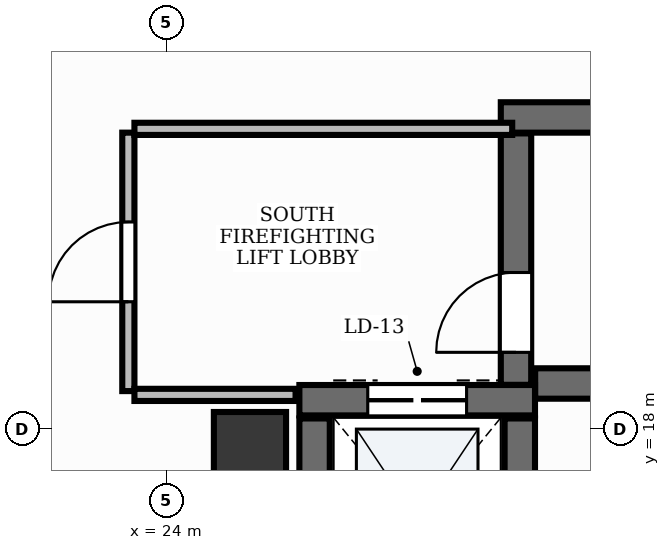
"""IFC4 building model, lengths in metres.
Left out: names, types, materials, properties, quantities, classifications, styles, units other than length and angle.
Written with IfcOpenShell. Run it as: python <this file> out.ifc"""

import sys

from ifc_helpers import new_model, si_unit, direction, frame, frame_2d, origin, origin_2d, place, context, subcontext, project, spatial, rectangle, extrude, element, fill, save


model = new_model("IFC4")
c1 = context("Model", 3, precision=1e-05, world=origin(), true_north=direction((0.0, 1.0)))
c2 = subcontext(c1, "Body", "Model", "MODEL_VIEW")
j1 = project(units=[si_unit("LENGTHUNIT", "METRE"), si_unit("PLANEANGLEUNIT", "RADIAN")], contexts=[c1])
p1 = place(None, origin())
s1 = spatial("IfcSite", under=j1, at=p1, CompositionType="ELEMENT")
p2 = place(p1, origin())
s2 = spatial("IfcBuilding", under=s1, at=p2, CompositionType="ELEMENT")
p3 = place(p2, frame((0.0, 0.0, 175.2)))
s3 = spatial("IfcBuildingStorey", under=s2, at=p3, CompositionType="ELEMENT", Elevation=175.2)
p4 = place(p3, frame((28.852, 18.6, 0.0), z_axis=(0.0, 0.0, 1.0), x_axis=(1.0, 0.0, 0.0)))
e1 = element("IfcWall", 1, at=p4, inside=s3, PredefinedType="SHEAR", context=c2, shape_type="SweptSolid", body=[
    extrude(rectangle(XDim=8.198, YDim=0.4, at=frame_2d((4.099, 0.0))), origin(), (0.0, 0.0, 1.0), 3.9),
])
p5 = place(p3, frame((28.4, 22.1, 0.0), z_axis=(0.0, 0.0, 1.0), x_axis=(1.0, 0.0, 0.0)))
e2 = element("IfcWall", 2, at=p5, inside=s3, PredefinedType="SHEAR", context=c2, shape_type="SweptSolid", body=[
    extrude(rectangle(XDim=8.65, YDim=0.4, at=frame_2d((4.325, 0.0))), origin(), (0.0, 0.0, 1.0), 3.9),
])
p6 = place(p3, frame((28.6, 18.582, 0.0), z_axis=(0.0, 0.0, 1.0), x_axis=(0.0, 1.0, 0.0)))
e3 = element("IfcWall", 3, at=p6, inside=s3, PredefinedType="SHEAR", context=c2, shape_type="SweptSolid", body=[
    extrude(rectangle(XDim=3.308, YDim=0.4, at=frame_2d((1.654, 0.0))), origin(), (0.0, 0.0, 1.0), 3.9),
])
p7 = place(p6, frame((0.428, 0.0, 0.0)))
e4 = element("IfcOpeningElement", 4, at=p7, cuts=e3, PredefinedType="OPENING", context=c2, shape_type="SweptSolid", body=[
    extrude(rectangle(XDim=1.05, YDim=2.15, at=frame_2d((0.525, 1.075))), frame((0.0, 0.215, 0.0), z_axis=(0.0, -1.0, 0.0), x_axis=(1.0, 0.0, 0.0)), (0.0, 0.0, 1.0), 0.43),
])
p8 = place(p3, frame((25.75, 18.38, 0.0), z_axis=(0.0, 0.0, 1.0), x_axis=(1.0, 0.0, 0.0)))
e5 = element("IfcWall", 5, at=p8, inside=s3, PredefinedType="SHEAR", context=c2, shape_type="SweptSolid", body=[
    extrude(rectangle(XDim=3.1, YDim=0.4, at=frame_2d((1.55, 0.0))), origin(), (0.0, 0.0, 1.0), 3.9),
])
p9 = place(p8, frame((0.9, 0.0, 0.0)))
e6 = element("IfcOpeningElement", 6, at=p9, cuts=e5, PredefinedType="OPENING", context=c2, shape_type="SweptSolid", body=[
    extrude(rectangle(XDim=1.3, YDim=2.2, at=frame_2d((0.65, 1.1))), frame((0.0, 0.215, 0.0), z_axis=(0.0, -1.0, 0.0), x_axis=(1.0, 0.0, 0.0)), (0.0, 0.0, 1.0), 0.43),
])
for number, where, z_axis, x_axis in (
    (7, (25.95, 15.44, 0.0), (0.0, 0.0, 1.0), (0.0, 1.0, 0.0)),
    (8, (28.65, 15.44, 0.0), (0.0, 0.0, 1.0), (0.0, 1.0, 0.0)),
):
    element("IfcWall", number, at=place(p3, frame(where, z_axis=z_axis, x_axis=x_axis)), inside=s3, PredefinedType="SHEAR", context=c2, shape_type="SweptSolid", body=[
        extrude(rectangle(XDim=2.7, YDim=0.4, at=frame_2d((1.35, 0.0))), origin(), (0.0, 0.0, 1.0), 3.9),
    ])
p10 = place(p3, frame((25.1, 17.75, -0.0), z_axis=(0.0, 0.0, 1.0), x_axis=(1.0, 0.0, 0.0)))
e9 = element("IfcColumn", 9, at=p10, inside=s3, PredefinedType="PILASTER", context=c2, shape_type="SweptSolid", body=[
    extrude(rectangle(XDim=0.95, YDim=0.95, at=origin_2d()), origin(), (0.0, 0.0, 1.0), 3.901),
])
p11 = place(p3, frame((23.5, 18.5, 0.0), z_axis=(0.0, 0.0, 1.0), x_axis=(0.0, 1.0, 0.0)))
e10 = element("IfcWall", 10, at=p11, inside=s3, PredefinedType="PARTITIONING", context=c2, shape_type="SweptSolid", body=[
    extrude(rectangle(XDim=3.4, YDim=0.16, at=frame_2d((1.7, 0.0))), origin(), (0.0, 0.0, 1.0), 2.91),
])
p12 = place(p11, frame((1.175, 0.0, 0.0)))
e11 = element("IfcOpeningElement", 11, at=p12, cuts=e10, PredefinedType="OPENING", context=c2, shape_type="SweptSolid", body=[
    extrude(rectangle(XDim=1.05, YDim=2.15, at=frame_2d((0.525, 1.075))), frame((0.0, 0.095, 0.0), z_axis=(0.0, -1.0, 0.0), x_axis=(1.0, 0.0, 0.0)), (0.0, 0.0, 1.0), 0.19),
])
p13 = place(p3, frame((23.58, 21.95, 0.0), z_axis=(0.0, 0.0, 1.0), x_axis=(1.0, 0.0, 0.0)))
e12 = element("IfcWall", 12, at=p13, inside=s3, PredefinedType="PARTITIONING", context=c2, shape_type="SweptSolid", body=[
    extrude(rectangle(XDim=4.97, YDim=0.16, at=frame_2d((2.485, 0.0))), origin(), (0.0, 0.0, 1.0), 2.91),
])
p14 = place(p3, frame((23.58, 18.45, 0.0), z_axis=(0.0, 0.0, 1.0), x_axis=(1.0, 0.0, 0.0)))
e13 = element("IfcWall", 13, at=p14, inside=s3, PredefinedType="PARTITIONING", context=c2, shape_type="SweptSolid", body=[
    extrude(rectangle(XDim=2.12, YDim=0.16, at=frame_2d((1.06, 0.0))), origin(), (0.0, 0.0, 1.0), 2.91),
])
p15 = place(p7, origin())
e14 = element("IfcDoor", 14, at=p15, inside=s3, OperationType="SINGLE_SWING_LEFT", PredefinedType="DOOR", context=c2, shape_type="SweptSolid", body=[
    extrude(rectangle(XDim=1.05, YDim=2.15, at=frame_2d((0.525, 1.075))), frame((0.0, 0.025, 0.0), z_axis=(0.0, -1.0, 0.0), x_axis=(1.0, 0.0, 0.0)), (0.0, 0.0, 1.0), 0.05),
])
fill(e4, e14)
p16 = place(p9, origin())
e15 = element("IfcDoor", 15, at=p16, inside=s3, OperationType="DOUBLE_DOOR_SLIDING", PredefinedType="DOOR", context=c2, shape_type="SweptSolid", body=[
    extrude(rectangle(XDim=1.3, YDim=2.2, at=frame_2d((0.65, 1.1))), frame((0.0, 0.025, 0.0), z_axis=(0.0, -1.0, 0.0), x_axis=(1.0, 0.0, 0.0)), (0.0, 0.0, 1.0), 0.05),
])
fill(e6, e15)
p17 = place(p12, origin())
e16 = element("IfcDoor", 16, at=p17, inside=s3, OperationType="SINGLE_SWING_LEFT", PredefinedType="DOOR", context=c2, shape_type="SweptSolid", body=[
    extrude(rectangle(XDim=1.05, YDim=2.15, at=frame_2d((0.525, 1.075))), frame((0.0, 0.025, 0.0), z_axis=(0.0, -1.0, 0.0), x_axis=(1.0, 0.0, 0.0)), (0.0, 0.0, 1.0), 0.05),
])
fill(e11, e16)
save(model, sys.argv[1])
